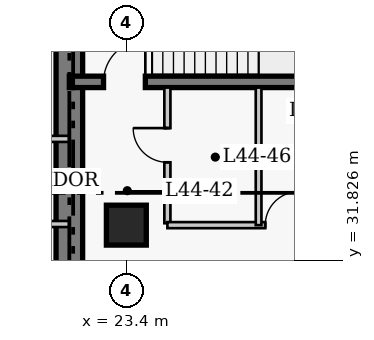
"""IFC4 building model, lengths in metres.
Left out: names, types, materials, properties, quantities, classifications, styles, units other than length and angle.
Written with IfcOpenShell. Run it as: python <this file> out.ifc"""

import sys

from ifc_helpers import new_model, si_unit, direction, frame, frame_2d, origin, origin_2d, place, context, subcontext, project, spatial, rectangle, extrude, element, fill, save


model = new_model("IFC4")
c1 = context("Model", 3, precision=1e-05, world=origin(), true_north=direction((0.0, 1.0)))
c2 = subcontext(c1, "Body", "Model", "MODEL_VIEW")
j1 = project(units=[si_unit("LENGTHUNIT", "METRE"), si_unit("PLANEANGLEUNIT", "RADIAN")], contexts=[c1])
p1 = place(None, origin())
s1 = spatial("IfcSite", under=j1, at=p1, CompositionType="ELEMENT")
p2 = place(p1, origin())
s2 = spatial("IfcBuilding", under=s1, at=p2, CompositionType="ELEMENT")
p3 = place(p2, frame((0.0, 0.0, 176.4)))
s3 = spatial("IfcBuildingStorey", under=s2, at=p3, CompositionType="ELEMENT", Elevation=176.4)
p4 = place(p3, frame((21.9, 27.05, 0.0), z_axis=(0.0, 0.0, 1.0), x_axis=(0.0, 1.0, 0.0)))
e1 = element("IfcWall", 1, at=p4, inside=s3, PredefinedType="SHEAR", context=c2, shape_type="SweptSolid", body=[
    extrude(rectangle(XDim=13.62, YDim=0.7, at=frame_2d((6.81, 0.0))), origin(), (0.0, 0.0, 1.0), 3.8),
])
p5 = place(p3, frame((21.9, 36.52, 0.0), z_axis=(0.0, 0.0, 1.0), x_axis=(1.0, 0.0, 0.0)))
e2 = element("IfcWall", 2, at=p5, inside=s3, PredefinedType="SHEAR", context=c2, shape_type="SweptSolid", body=[
    extrude(rectangle(XDim=8.32, YDim=0.3, at=frame_2d((4.16, 0.0))), origin(), (0.0, 0.0, 1.0), 3.8),
])
p6 = place(p5, frame((0.9, 0.0, 0.0)))
e3 = element("IfcOpeningElement", 3, at=p6, cuts=e2, PredefinedType="OPENING", context=c2, shape_type="SweptSolid", body=[
    extrude(rectangle(XDim=1.1, YDim=2.15, at=frame_2d((0.55, 1.075))), frame((0.0, 0.16, 0.0), z_axis=(0.0, -1.0, 0.0), x_axis=(1.0, 0.0, 0.0)), (0.0, 0.0, 1.0), 0.32),
])
p7 = place(p3, frame((23.4, 32.75, 0.0), z_axis=(0.0, 0.0, 1.0), x_axis=(1.0, 0.0, 0.0)))
e4 = element("IfcColumn", 4, at=p7, inside=s3, PredefinedType="COLUMN", context=c2, shape_type="SweptSolid", body=[
    extrude(rectangle(XDim=1.05, YDim=1.05, at=origin_2d()), origin(), (0.0, 0.0, 1.0), 3.8),
])
p8 = place(p3, frame((24.48, 32.8, 0.0), z_axis=(0.0, 0.0, 1.0), x_axis=(0.0, 1.0, 0.0)))
e5 = element("IfcWall", 5, at=p8, inside=s3, PredefinedType="PARTITIONING", context=c2, shape_type="SweptSolid", body=[
    extrude(rectangle(XDim=3.57, YDim=0.16, at=frame_2d((1.785, 0.0))), origin(), (0.0, 0.0, 1.0), 3.55),
])
p9 = place(p8, frame((1.604, 0.0, 0.0)))
e6 = element("IfcOpeningElement", 6, at=p9, cuts=e5, PredefinedType="OPENING", context=c2, shape_type="SweptSolid", body=[
    extrude(rectangle(XDim=0.9, YDim=2.1, at=frame_2d((0.45, 1.05))), frame((0.0, 0.09, 0.0), z_axis=(0.0, -1.0, 0.0), x_axis=(1.0, 0.0, 0.0)), (0.0, 0.0, 1.0), 0.18),
])
p10 = place(p3, frame((24.48, 32.75, 0.0), z_axis=(0.0, 0.0, 1.0), x_axis=(1.0, 0.0, 0.0)))
e7 = element("IfcWall", 7, at=p10, inside=s3, PredefinedType="PARTITIONING", context=c2, shape_type="SweptSolid", body=[
    extrude(rectangle(XDim=3.97, YDim=0.16, at=frame_2d((1.985, 0.0))), origin(), (0.0, 0.0, 1.0), 3.55),
])
p11 = place(p10, frame((2.575, 0.0, 0.0)))
e8 = element("IfcOpeningElement", 8, at=p11, cuts=e7, PredefinedType="OPENING", context=c2, shape_type="SweptSolid", body=[
    extrude(rectangle(XDim=0.88, YDim=2.05, at=frame_2d((0.44, 1.025))), frame((0.0, 0.09, 0.0), z_axis=(0.0, -1.0, 0.0), x_axis=(1.0, 0.0, 0.0)), (0.0, 0.0, 1.0), 0.18),
])
p12 = place(p3, frame((26.88, 32.75, 0.0), z_axis=(0.0, 0.0, 1.0), x_axis=(0.0, 1.0, 0.0)))
e9 = element("IfcWall", 9, at=p12, inside=s3, PredefinedType="PARTITIONING", context=c2, shape_type="SweptSolid", body=[
    extrude(rectangle(XDim=3.62, YDim=0.15, at=frame_2d((1.81, 0.0))), origin(), (0.0, 0.0, 1.0), 3.55),
])
for number, where, z_axis, x_axis in (
    (10, (20.46, 35.02, 0.0), (0.0, 0.0, 1.0), (1.0, 0.0, 0.0)),
    (11, (20.46, 32.78, 0.0), (0.0, 0.0, 1.0), (1.0, 0.0, 0.0)),
):
    element("IfcWall", number, at=place(p3, frame(where, z_axis=z_axis, x_axis=x_axis)), inside=s3, PredefinedType="PARTITIONING", context=c2, shape_type="SweptSolid", body=[
        extrude(rectangle(XDim=1.44, YDim=0.16, at=frame_2d((0.72, 0.0))), origin(), (0.0, 0.0, 1.0), 3.55),
    ])
p13 = place(p9, origin())
e12 = element("IfcDoor", 12, at=p13, inside=s3, OperationType="SINGLE_SWING_RIGHT", PredefinedType="DOOR", context=c2, shape_type="SweptSolid", body=[
    extrude(rectangle(XDim=0.9, YDim=2.1, at=frame_2d((0.45, 1.05))), frame((0.0, 0.025, 0.0), z_axis=(0.0, -1.0, 0.0), x_axis=(1.0, 0.0, 0.0)), (0.0, 0.0, 1.0), 0.05),
])
fill(e6, e12)
p14 = place(p11, origin())
e13 = element("IfcDoor", 13, at=p14, inside=s3, OperationType="SINGLE_SWING_RIGHT", PredefinedType="DOOR", context=c2, shape_type="SweptSolid", body=[
    extrude(rectangle(XDim=0.88, YDim=2.05, at=frame_2d((0.44, 1.025))), frame((0.0, 0.025, 0.0), z_axis=(0.0, -1.0, 0.0), x_axis=(1.0, 0.0, 0.0)), (0.0, 0.0, 1.0), 0.05),
])
fill(e8, e13)
p15 = place(p6, origin())
e14 = element("IfcDoor", 14, at=p15, inside=s3, OperationType="SINGLE_SWING_RIGHT", PredefinedType="DOOR", context=c2, shape_type="SweptSolid", body=[
    extrude(rectangle(XDim=1.1, YDim=2.15, at=frame_2d((0.55, 1.075))), frame((0.0, 0.025, 0.0), z_axis=(0.0, -1.0, 0.0), x_axis=(1.0, 0.0, 0.0)), (0.0, 0.0, 1.0), 0.05),
])
fill(e3, e14)
save(model, sys.argv[1])
